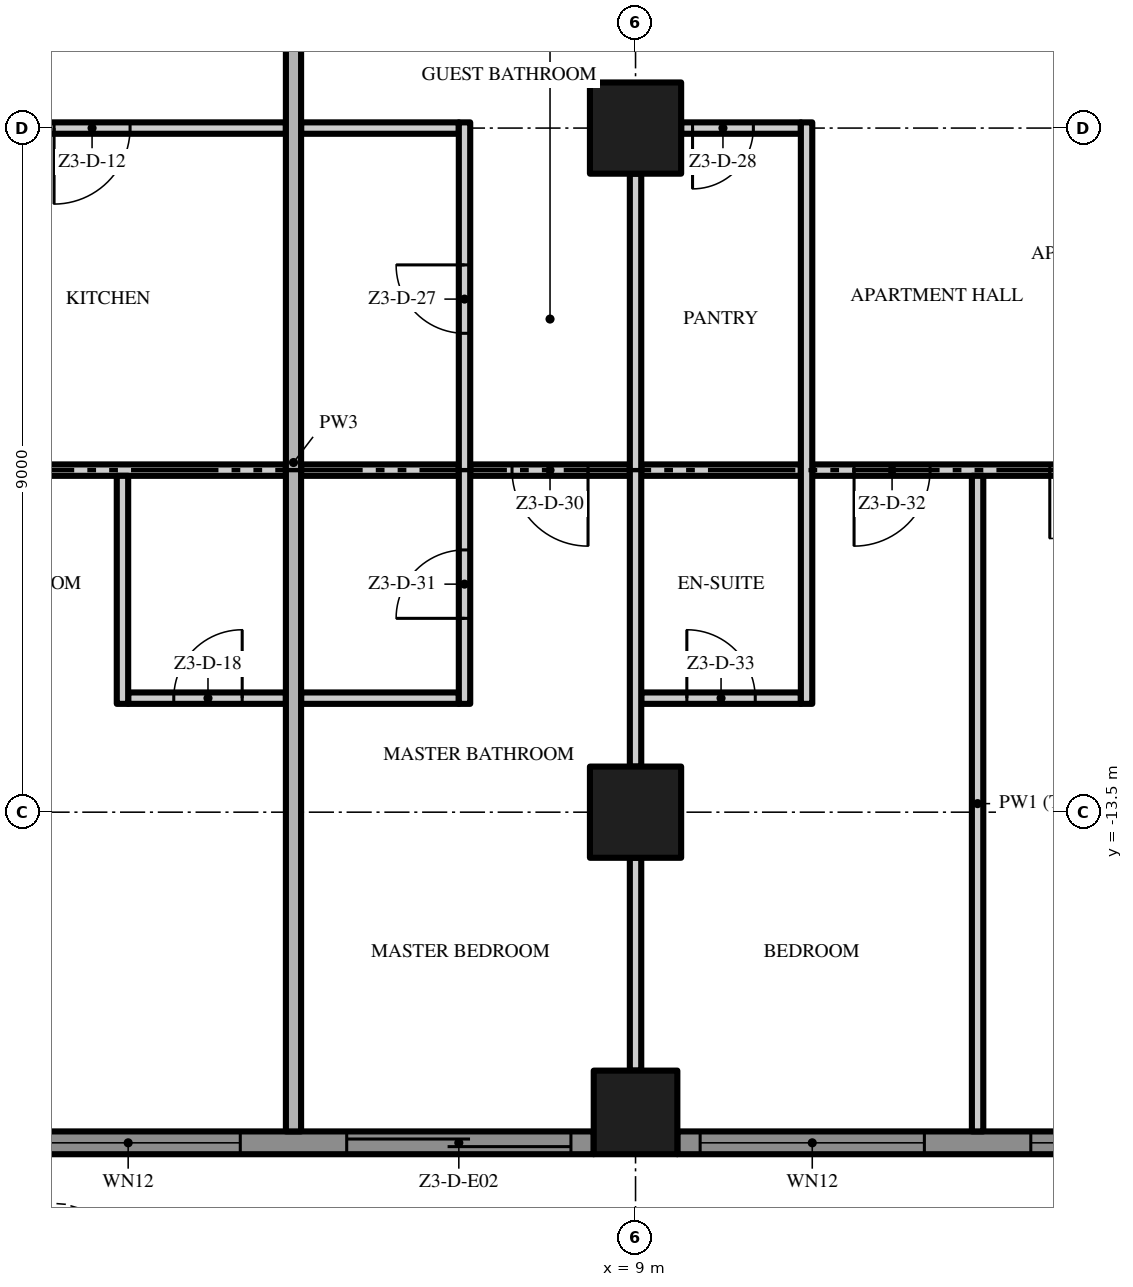
"""IFC4 building model, lengths in metres.
Left out: names, types, materials, properties, quantities, classifications, styles, units other than length and angle.
Written with IfcOpenShell. Run it as: python <this file> out.ifc"""

import sys

from ifc_helpers import new_model, si_unit, direction, frame, frame_2d, origin, origin_2d, place, context, subcontext, project, spatial, polyline, rectangle, outline, extrude, element, fill, save


model = new_model("IFC4")
c1 = context("Model", 3, precision=1e-05, world=origin(), true_north=direction((0.0, 1.0)))
c2 = subcontext(c1, "Body", "Model", "MODEL_VIEW")
j1 = project(units=[si_unit("LENGTHUNIT", "METRE"), si_unit("PLANEANGLEUNIT", "RADIAN")], contexts=[c1])
p1 = place(None, origin())
s1 = spatial("IfcSite", under=j1, at=p1, CompositionType="ELEMENT")
p2 = place(p1, origin())
s2 = spatial("IfcBuilding", under=s1, at=p2, CompositionType="ELEMENT")
p3 = place(p2, frame((0.0, 0.0, 159.2)))
s3 = spatial("IfcBuildingStorey", under=s2, at=p3, CompositionType="ELEMENT", Elevation=159.2)
p4 = place(p3, frame((9.0, -13.5, 0.0), z_axis=(0.0, 0.0, 1.0), x_axis=(1.0, 0.0, 0.0)))
e1 = element("IfcColumn", 1, at=p4, inside=s3, PredefinedType="COLUMN", context=c2, shape_type="SweptSolid", body=[
    extrude(rectangle(XDim=1.2, YDim=1.2, at=origin_2d()), origin(), (0.0, 0.0, 1.0), 3.5),
])
p5 = place(p3, frame((9.0, -17.45, 0.0), z_axis=(0.0, 0.0, 1.0), x_axis=(1.0, 0.0, 0.0)))
e2 = element("IfcColumn", 2, at=p5, inside=s3, PredefinedType="COLUMN", context=c2, shape_type="SweptSolid", body=[
    extrude(rectangle(XDim=1.1, YDim=1.1, at=origin_2d()), origin(), (0.0, 0.0, 1.0), 3.5),
])
p6 = place(p3, frame((9.0, -4.5, 0.0), z_axis=(0.0, 0.0, 1.0), x_axis=(1.0, 0.0, 0.0)))
e3 = element("IfcColumn", 3, at=p6, inside=s3, PredefinedType="COLUMN", context=c2, shape_type="SweptSolid", body=[
    extrude(rectangle(XDim=1.2, YDim=1.2, at=origin_2d()), origin(), (0.0, 0.0, 1.0), 3.5),
])
p7 = place(p3, frame((8.45, -17.85, 0.0), z_axis=(0.0, 0.0, 1.0), x_axis=(-1.0, 0.0, 0.0)))
e4 = element("IfcWall", 4, at=p7, inside=s3, PredefinedType="SOLIDWALL", context=c2, shape_type="SweptSolid", body=[
    extrude(rectangle(XDim=7.9, YDim=0.3, at=frame_2d((3.95, 0.0))), origin(), (0.0, 0.0, 1.0), 3.5),
])
p8 = place(p7, frame((4.65, 0.0, 0.45)))
e5 = element("IfcOpeningElement", 5, at=p8, cuts=e4, PredefinedType="OPENING", context=c2, shape_type="SweptSolid", body=[
    extrude(rectangle(XDim=2.95, YDim=2.65, at=frame_2d((1.475, 1.325))), frame((0.0, 0.16, 0.0), z_axis=(0.0, -1.0, 0.0), x_axis=(1.0, 0.0, 0.0)), (0.0, 0.0, 1.0), 0.32),
])
p9 = place(p7, frame((0.3, 0.0, 0.0)))
e6 = element("IfcOpeningElement", 6, at=p9, cuts=e4, PredefinedType="OPENING", context=c2, shape_type="SweptSolid", body=[
    extrude(rectangle(XDim=2.95, YDim=2.4, at=frame_2d((1.475, 1.2))), frame((0.0, 0.16, 0.0), z_axis=(0.0, -1.0, 0.0), x_axis=(1.0, 0.0, 0.0)), (0.0, 0.0, 1.0), 0.32),
])
p10 = place(p3, frame((16.9, -17.85, 0.0), z_axis=(0.0, 0.0, 1.0), x_axis=(-1.0, 0.0, 0.0)))
e7 = element("IfcWall", 7, at=p10, inside=s3, PredefinedType="SOLIDWALL", context=c2, shape_type="SweptSolid", body=[
    extrude(rectangle(XDim=7.35, YDim=0.3, at=frame_2d((3.675, 0.0))), origin(), (0.0, 0.0, 1.0), 3.5),
])
p11 = place(p10, frame((4.1, 0.0, 0.45)))
e8 = element("IfcOpeningElement", 8, at=p11, cuts=e7, PredefinedType="OPENING", context=c2, shape_type="SweptSolid", body=[
    extrude(rectangle(XDim=2.95, YDim=2.65, at=frame_2d((1.475, 1.325))), frame((0.0, 0.16, 0.0), z_axis=(0.0, -1.0, 0.0), x_axis=(1.0, 0.0, 0.0)), (0.0, 0.0, 1.0), 0.32),
])
p12 = place(p10, frame((0.3, 0.0, 0.45)))
e9 = element("IfcOpeningElement", 9, at=p12, cuts=e7, PredefinedType="OPENING", context=c2, shape_type="SweptSolid", body=[
    extrude(rectangle(XDim=2.4, YDim=2.65, at=frame_2d((1.2, 1.325))), frame((0.0, 0.16, 0.0), z_axis=(0.0, -1.0, 0.0), x_axis=(1.0, 0.0, 0.0)), (0.0, 0.0, 1.0), 0.32),
])
p13 = place(p3, origin())
e10 = element("IfcWall", 10, at=p13, inside=s3, PredefinedType="USERDEFINED", context=c2, shape_type="SweptSolid", body=[
    extrude(outline(polyline([(-18.0, -19.8), (-16.5, -19.095), (-15.0, -18.659), (-14.25, -18.6), (-13.5, -18.659), (-12.0, -19.095), (-10.5, -19.8), (-9.0, -20.505), (-7.5, -20.941), (-6.75, -21.0), (-6.0, -20.941), (-4.5, -20.505), (-3.0, -19.8), (-1.5, -19.095), (0.0, -18.659), (0.75, -18.6), (1.5, -18.659), (3.0, -19.095), (4.5, -19.8), (6.0, -20.505), (7.5, -20.941), (8.25, -21.0), (9.0, -20.941), (10.5, -20.505), (12.0, -19.8), (13.5, -19.095), (15.0, -18.659), (15.75, -18.6), (16.5, -18.659), (18.0, -19.095), (18.07, -18.855), (16.545, -18.411), (15.75, -18.349), (14.955, -18.411), (13.411, -18.86), (11.894, -19.574), (10.411, -20.271), (8.955, -20.694), (8.25, -20.749), (7.545, -20.694), (6.089, -20.271), (4.606, -19.574), (3.089, -18.86), (1.545, -18.411), (0.75, -18.349), (-0.045, -18.411), (-1.589, -18.86), (-3.106, -19.574), (-4.589, -20.271), (-6.045, -20.694), (-6.75, -20.749), (-7.455, -20.694), (-8.911, -20.271), (-10.394, -19.574), (-11.911, -18.86), (-13.455, -18.411), (-14.25, -18.349), (-15.045, -18.411), (-16.589, -18.86), (-18.106, -19.574), (-18.0, -19.8)])), origin(), (0.0, 0.0, 1.0), 0.9),
])
p14 = place(p3, frame((2.325, -12.0, 0.0), z_axis=(0.0, 0.0, 1.0), x_axis=(1.0, 0.0, 0.0)))
e11 = element("IfcWall", 11, at=p14, inside=s3, PredefinedType="PARTITIONING", context=c2, shape_type="SweptSolid", body=[
    extrude(rectangle(XDim=2.075, YDim=0.15, at=frame_2d((1.038, 0.0))), origin(), (0.0, 0.0, 1.0), 3.5),
])
p15 = place(p14, frame((0.6, 0.0, 0.0)))
e12 = element("IfcOpeningElement", 12, at=p15, cuts=e11, PredefinedType="OPENING", context=c2, shape_type="SweptSolid", body=[
    extrude(rectangle(XDim=0.9, YDim=2.1, at=frame_2d((0.45, 1.05))), frame((0.0, 0.085, 0.0), z_axis=(0.0, -1.0, 0.0), x_axis=(1.0, 0.0, 0.0)), (0.0, 0.0, 1.0), 0.17),
])
p16 = place(p3, frame((4.6, -12.0, 0.0), z_axis=(0.0, 0.0, 1.0), x_axis=(1.0, 0.0, 0.0)))
e13 = element("IfcWall", 13, at=p16, inside=s3, PredefinedType="PARTITIONING", context=c2, shape_type="SweptSolid", body=[
    extrude(rectangle(XDim=2.075, YDim=0.15, at=frame_2d((1.038, 0.0))), origin(), (0.0, 0.0, 1.0), 3.5),
])
p17 = place(p3, frame((9.075, -12.0, 0.0), z_axis=(0.0, 0.0, 1.0), x_axis=(1.0, 0.0, 0.0)))
e14 = element("IfcWall", 14, at=p17, inside=s3, PredefinedType="PARTITIONING", context=c2, shape_type="SweptSolid", body=[
    extrude(rectangle(XDim=2.1, YDim=0.15, at=frame_2d((1.05, 0.0))), origin(), (0.0, 0.0, 1.0), 3.5),
])
p18 = place(p17, frame((0.6, 0.0, 0.0)))
e15 = element("IfcOpeningElement", 15, at=p18, cuts=e14, PredefinedType="OPENING", context=c2, shape_type="SweptSolid", body=[
    extrude(rectangle(XDim=0.9, YDim=2.1, at=frame_2d((0.45, 1.05))), frame((0.0, 0.085, 0.0), z_axis=(0.0, -1.0, 0.0), x_axis=(1.0, 0.0, 0.0)), (0.0, 0.0, 1.0), 0.17),
])
p19 = place(p3, frame((4.4, -9.0, 0.0), z_axis=(0.0, 0.0, 1.0), x_axis=(-1.0, 0.0, 0.0)))
e16 = element("IfcWall", 16, at=p19, inside=s3, PredefinedType="PARTITIONING", context=c2, shape_type="SweptSolid", body=[
    extrude(rectangle(XDim=8.825, YDim=0.15, at=frame_2d((4.412, 0.0))), origin(), (0.0, 0.0, 1.0), 3.5),
])
p20 = place(p19, frame((6.125, 0.0, 0.0)))
e17 = element("IfcOpeningElement", 17, at=p20, cuts=e16, PredefinedType="OPENING", context=c2, shape_type="SweptSolid", body=[
    extrude(rectangle(XDim=1.8, YDim=2.4, at=frame_2d((0.9, 1.2))), frame((0.0, 0.085, 0.0), z_axis=(0.0, -1.0, 0.0), x_axis=(1.0, 0.0, 0.0)), (0.0, 0.0, 1.0), 0.17),
])
p21 = place(p3, frame((4.6, -9.0, 0.0), z_axis=(0.0, 0.0, 1.0), x_axis=(1.0, 0.0, 0.0)))
e18 = element("IfcWall", 18, at=p21, inside=s3, PredefinedType="PARTITIONING", context=c2, shape_type="SweptSolid", body=[
    extrude(rectangle(XDim=2.075, YDim=0.15, at=frame_2d((1.038, 0.0))), origin(), (0.0, 0.0, 1.0), 3.5),
])
p22 = place(p3, frame((8.925, -9.0, 0.0), z_axis=(0.0, 0.0, 1.0), x_axis=(-1.0, 0.0, 0.0)))
e19 = element("IfcWall", 19, at=p22, inside=s3, PredefinedType="PARTITIONING", context=c2, shape_type="SweptSolid", body=[
    extrude(rectangle(XDim=2.1, YDim=0.15, at=frame_2d((1.05, 0.0))), origin(), (0.0, 0.0, 1.0), 3.5),
])
p23 = place(p22, frame((0.55, 0.0, 0.0)))
e20 = element("IfcOpeningElement", 20, at=p23, cuts=e19, PredefinedType="OPENING", context=c2, shape_type="SweptSolid", body=[
    extrude(rectangle(XDim=1.0, YDim=2.4, at=frame_2d((0.5, 1.2))), frame((0.0, 0.085, 0.0), z_axis=(0.0, -1.0, 0.0), x_axis=(1.0, 0.0, 0.0)), (0.0, 0.0, 1.0), 0.17),
])
p24 = place(p3, frame((9.075, -9.0, 0.0), z_axis=(0.0, 0.0, 1.0), x_axis=(1.0, 0.0, 0.0)))
e21 = element("IfcWall", 21, at=p24, inside=s3, PredefinedType="PARTITIONING", context=c2, shape_type="SweptSolid", body=[
    extrude(rectangle(XDim=2.1, YDim=0.15, at=frame_2d((1.05, 0.0))), origin(), (0.0, 0.0, 1.0), 3.5),
])
p25 = place(p3, frame((22.2, -9.0, 0.0), z_axis=(0.0, 0.0, 1.0), x_axis=(-1.0, 0.0, 0.0)))
e22 = element("IfcWall", 22, at=p25, inside=s3, PredefinedType="PARTITIONING", context=c2, shape_type="SweptSolid", body=[
    extrude(rectangle(XDim=10.875, YDim=0.15, at=frame_2d((5.438, 0.0))), origin(), (0.0, 0.0, 1.0), 3.5),
])
p26 = place(p25, frame((9.325, 0.0, 0.0)))
e23 = element("IfcOpeningElement", 23, at=p26, cuts=e22, PredefinedType="OPENING", context=c2, shape_type="SweptSolid", body=[
    extrude(rectangle(XDim=1.0, YDim=2.4, at=frame_2d((0.5, 1.2))), frame((0.0, 0.085, 0.0), z_axis=(0.0, -1.0, 0.0), x_axis=(1.0, 0.0, 0.0)), (0.0, 0.0, 1.0), 0.17),
])
p27 = place(p25, frame((5.95, 0.0, 0.0)))
e24 = element("IfcOpeningElement", 24, at=p27, cuts=e22, PredefinedType="OPENING", context=c2, shape_type="SweptSolid", body=[
    extrude(rectangle(XDim=1.8, YDim=2.4, at=frame_2d((0.9, 1.2))), frame((0.0, 0.085, 0.0), z_axis=(0.0, -1.0, 0.0), x_axis=(1.0, 0.0, 0.0)), (0.0, 0.0, 1.0), 0.17),
])
p28 = place(p3, frame((4.4, -4.5, 0.0), z_axis=(0.0, 0.0, 1.0), x_axis=(-1.0, 0.0, 0.0)))
e25 = element("IfcWall", 25, at=p28, inside=s3, PredefinedType="PARTITIONING", context=c2, shape_type="SweptSolid", body=[
    extrude(rectangle(XDim=3.8, YDim=0.15, at=frame_2d((1.9, 0.0))), origin(), (0.0, 0.0, 1.0), 3.5),
])
p29 = place(p28, frame((2.05, 0.0, 0.0)))
e26 = element("IfcOpeningElement", 26, at=p29, cuts=e25, PredefinedType="OPENING", context=c2, shape_type="SweptSolid", body=[
    extrude(rectangle(XDim=1.0, YDim=2.4, at=frame_2d((0.5, 1.2))), frame((0.0, 0.085, 0.0), z_axis=(0.0, -1.0, 0.0), x_axis=(1.0, 0.0, 0.0)), (0.0, 0.0, 1.0), 0.17),
])
p30 = place(p3, frame((4.6, -4.5, 0.0), z_axis=(0.0, 0.0, 1.0), x_axis=(1.0, 0.0, 0.0)))
e27 = element("IfcWall", 27, at=p30, inside=s3, PredefinedType="PARTITIONING", context=c2, shape_type="SweptSolid", body=[
    extrude(rectangle(XDim=2.075, YDim=0.15, at=frame_2d((1.038, 0.0))), origin(), (0.0, 0.0, 1.0), 3.5),
])
p31 = place(p3, frame((11.175, -4.5, 0.0), z_axis=(0.0, 0.0, 1.0), x_axis=(-1.0, 0.0, 0.0)))
e28 = element("IfcWall", 28, at=p31, inside=s3, PredefinedType="PARTITIONING", context=c2, shape_type="SweptSolid", body=[
    extrude(rectangle(XDim=1.575, YDim=0.15, at=frame_2d((0.787, 0.0))), origin(), (0.0, 0.0, 1.0), 3.5),
])
p32 = place(p31, frame((0.625, 0.0, 0.0)))
e29 = element("IfcOpeningElement", 29, at=p32, cuts=e28, PredefinedType="OPENING", context=c2, shape_type="SweptSolid", body=[
    extrude(rectangle(XDim=0.8, YDim=2.0, at=frame_2d((0.4, 1.0))), frame((0.0, 0.085, 0.0), z_axis=(0.0, -1.0, 0.0), x_axis=(1.0, 0.0, 0.0)), (0.0, 0.0, 1.0), 0.17),
])
p33 = place(p3, frame((2.25, -12.075, 0.0), z_axis=(0.0, 0.0, 1.0), x_axis=(0.0, 1.0, 0.0)))
e30 = element("IfcWall", 30, at=p33, inside=s3, PredefinedType="PARTITIONING", context=c2, shape_type="SweptSolid", body=[
    extrude(rectangle(XDim=3.0, YDim=0.15, at=frame_2d((1.5, 0.0))), origin(), (0.0, 0.0, 1.0), 3.5),
])
p34 = place(p3, frame((4.5, -17.7, 0.0), z_axis=(0.0, 0.0, 1.0), x_axis=(0.0, 1.0, 0.0)))
e31 = element("IfcWall", 31, at=p34, inside=s3, PredefinedType="PARTITIONING", context=c2, shape_type="SweptSolid", body=[
    extrude(rectangle(XDim=17.6, YDim=0.2, at=frame_2d((8.8, 0.0))), origin(), (0.0, 0.0, 1.0), 3.5),
])
p35 = place(p3, frame((6.75, -12.075, 0.0), z_axis=(0.0, 0.0, 1.0), x_axis=(0.0, 1.0, 0.0)))
e32 = element("IfcWall", 32, at=p35, inside=s3, PredefinedType="PARTITIONING", context=c2, shape_type="SweptSolid", body=[
    extrude(rectangle(XDim=7.65, YDim=0.15, at=frame_2d((3.825, 0.0))), origin(), (0.0, 0.0, 1.0), 3.5),
])
p36 = place(p35, frame((4.875, 0.0, 0.0)))
e33 = element("IfcOpeningElement", 33, at=p36, cuts=e32, PredefinedType="OPENING", context=c2, shape_type="SweptSolid", body=[
    extrude(rectangle(XDim=0.9, YDim=2.1, at=frame_2d((0.45, 1.05))), frame((0.0, 0.085, 0.0), z_axis=(0.0, -1.0, 0.0), x_axis=(1.0, 0.0, 0.0)), (0.0, 0.0, 1.0), 0.17),
])
p37 = place(p35, frame((1.125, 0.0, 0.0)))
e34 = element("IfcOpeningElement", 34, at=p37, cuts=e32, PredefinedType="OPENING", context=c2, shape_type="SweptSolid", body=[
    extrude(rectangle(XDim=0.9, YDim=2.1, at=frame_2d((0.45, 1.05))), frame((0.0, 0.085, 0.0), z_axis=(0.0, -1.0, 0.0), x_axis=(1.0, 0.0, 0.0)), (0.0, 0.0, 1.0), 0.17),
])
p38 = place(p3, frame((9.0, -16.9, 0.0), z_axis=(0.0, 0.0, 1.0), x_axis=(0.0, 1.0, 0.0)))
e35 = element("IfcWall", 35, at=p38, inside=s3, PredefinedType="PARTITIONING", context=c2, shape_type="SweptSolid", body=[
    extrude(rectangle(XDim=2.8, YDim=0.15, at=frame_2d((1.4, 0.0))), origin(), (0.0, 0.0, 1.0), 3.5),
])
p39 = place(p3, frame((9.0, -12.9, 0.0), z_axis=(0.0, 0.0, 1.0), x_axis=(0.0, 1.0, 0.0)))
e36 = element("IfcWall", 36, at=p39, inside=s3, PredefinedType="PARTITIONING", context=c2, shape_type="SweptSolid", body=[
    extrude(rectangle(XDim=7.8, YDim=0.15, at=frame_2d((3.9, 0.0))), origin(), (0.0, 0.0, 1.0), 3.5),
])
p40 = place(p3, frame((11.25, -12.075, 0.0), z_axis=(0.0, 0.0, 1.0), x_axis=(0.0, 1.0, 0.0)))
e37 = element("IfcWall", 37, at=p40, inside=s3, PredefinedType="PARTITIONING", context=c2, shape_type="SweptSolid", body=[
    extrude(rectangle(XDim=7.65, YDim=0.15, at=frame_2d((3.825, 0.0))), origin(), (0.0, 0.0, 1.0), 3.5),
])
p41 = place(p3, frame((13.5, -17.7, 0.0), z_axis=(0.0, 0.0, 1.0), x_axis=(0.0, 1.0, 0.0)))
e38 = element("IfcWall", 38, at=p41, inside=s3, PredefinedType="PARTITIONING", context=c2, shape_type="SweptSolid", body=[
    extrude(rectangle(XDim=8.625, YDim=0.15, at=frame_2d((4.312, 0.0))), origin(), (0.0, 0.0, 1.0), 3.5),
])
p42 = place(p8, origin())
e39 = element("IfcWindow", 39, at=p42, inside=s3, PartitioningType="SINGLE_PANEL", PredefinedType="WINDOW", context=c2, shape_type="SweptSolid", body=[
    extrude(rectangle(XDim=2.95, YDim=2.65, at=frame_2d((1.475, 1.325))), frame((0.0, 0.03, 0.0), z_axis=(0.0, -1.0, 0.0), x_axis=(1.0, 0.0, 0.0)), (0.0, 0.0, 1.0), 0.06),
])
fill(e5, e39)
p43 = place(p9, origin())
e40 = element("IfcDoor", 40, at=p43, inside=s3, OperationType="SINGLE_SWING_LEFT", PredefinedType="DOOR", context=c2, shape_type="SweptSolid", body=[
    extrude(rectangle(XDim=2.95, YDim=2.4, at=frame_2d((1.475, 1.2))), frame((0.0, 0.025, 0.0), z_axis=(0.0, -1.0, 0.0), x_axis=(1.0, 0.0, 0.0)), (0.0, 0.0, 1.0), 0.05),
])
fill(e6, e40)
p44 = place(p11, origin())
e41 = element("IfcWindow", 41, at=p44, inside=s3, PartitioningType="SINGLE_PANEL", PredefinedType="WINDOW", context=c2, shape_type="SweptSolid", body=[
    extrude(rectangle(XDim=2.95, YDim=2.65, at=frame_2d((1.475, 1.325))), frame((0.0, 0.03, 0.0), z_axis=(0.0, -1.0, 0.0), x_axis=(1.0, 0.0, 0.0)), (0.0, 0.0, 1.0), 0.06),
])
fill(e8, e41)
p45 = place(p12, origin())
e42 = element("IfcWindow", 42, at=p45, inside=s3, PartitioningType="SINGLE_PANEL", PredefinedType="WINDOW", context=c2, shape_type="SweptSolid", body=[
    extrude(rectangle(XDim=2.4, YDim=2.65, at=frame_2d((1.2, 1.325))), frame((0.0, 0.03, 0.0), z_axis=(0.0, -1.0, 0.0), x_axis=(1.0, 0.0, 0.0)), (0.0, 0.0, 1.0), 0.06),
])
fill(e9, e42)
p46 = place(p29, origin())
e43 = element("IfcDoor", 43, at=p46, inside=s3, OperationType="SINGLE_SWING_RIGHT", PredefinedType="DOOR", context=c2, shape_type="SweptSolid", body=[
    extrude(rectangle(XDim=1.0, YDim=2.4, at=frame_2d((0.5, 1.2))), frame((0.0, 0.025, 0.0), z_axis=(0.0, -1.0, 0.0), x_axis=(1.0, 0.0, 0.0)), (0.0, 0.0, 1.0), 0.05),
])
fill(e26, e43)
p47 = place(p15, origin())
e44 = element("IfcDoor", 44, at=p47, inside=s3, OperationType="SINGLE_SWING_RIGHT", PredefinedType="DOOR", context=c2, shape_type="SweptSolid", body=[
    extrude(rectangle(XDim=0.9, YDim=2.1, at=frame_2d((0.45, 1.05))), frame((0.0, 0.025, 0.0), z_axis=(0.0, -1.0, 0.0), x_axis=(1.0, 0.0, 0.0)), (0.0, 0.0, 1.0), 0.05),
])
fill(e12, e44)
p48 = place(p36, origin())
e45 = element("IfcDoor", 45, at=p48, inside=s3, OperationType="SINGLE_SWING_RIGHT", PredefinedType="DOOR", context=c2, shape_type="SweptSolid", body=[
    extrude(rectangle(XDim=0.9, YDim=2.1, at=frame_2d((0.45, 1.05))), frame((0.0, 0.025, 0.0), z_axis=(0.0, -1.0, 0.0), x_axis=(1.0, 0.0, 0.0)), (0.0, 0.0, 1.0), 0.05),
])
fill(e33, e45)
p49 = place(p32, origin())
e46 = element("IfcDoor", 46, at=p49, inside=s3, OperationType="SINGLE_SWING_RIGHT", PredefinedType="DOOR", context=c2, shape_type="SweptSolid", body=[
    extrude(rectangle(XDim=0.8, YDim=2.0, at=frame_2d((0.4, 1.0))), frame((0.0, 0.025, 0.0), z_axis=(0.0, -1.0, 0.0), x_axis=(1.0, 0.0, 0.0)), (0.0, 0.0, 1.0), 0.05),
])
fill(e29, e46)
p50 = place(p23, origin())
e47 = element("IfcDoor", 47, at=p50, inside=s3, OperationType="SINGLE_SWING_LEFT", PredefinedType="DOOR", context=c2, shape_type="SweptSolid", body=[
    extrude(rectangle(XDim=1.0, YDim=2.4, at=frame_2d((0.5, 1.2))), frame((0.0, 0.025, 0.0), z_axis=(0.0, -1.0, 0.0), x_axis=(1.0, 0.0, 0.0)), (0.0, 0.0, 1.0), 0.05),
])
fill(e20, e47)
p51 = place(p37, origin())
e48 = element("IfcDoor", 48, at=p51, inside=s3, OperationType="SINGLE_SWING_LEFT", PredefinedType="DOOR", context=c2, shape_type="SweptSolid", body=[
    extrude(rectangle(XDim=0.9, YDim=2.1, at=frame_2d((0.45, 1.05))), frame((0.0, 0.025, 0.0), z_axis=(0.0, -1.0, 0.0), x_axis=(1.0, 0.0, 0.0)), (0.0, 0.0, 1.0), 0.05),
])
fill(e34, e48)
p52 = place(p26, origin())
e49 = element("IfcDoor", 49, at=p52, inside=s3, OperationType="SINGLE_SWING_RIGHT", PredefinedType="DOOR", context=c2, shape_type="SweptSolid", body=[
    extrude(rectangle(XDim=1.0, YDim=2.4, at=frame_2d((0.5, 1.2))), frame((0.0, 0.025, 0.0), z_axis=(0.0, -1.0, 0.0), x_axis=(1.0, 0.0, 0.0)), (0.0, 0.0, 1.0), 0.05),
])
fill(e23, e49)
p53 = place(p18, origin())
e50 = element("IfcDoor", 50, at=p53, inside=s3, OperationType="SINGLE_SWING_LEFT", PredefinedType="DOOR", context=c2, shape_type="SweptSolid", body=[
    extrude(rectangle(XDim=0.9, YDim=2.1, at=frame_2d((0.45, 1.05))), frame((0.0, 0.025, 0.0), z_axis=(0.0, -1.0, 0.0), x_axis=(1.0, 0.0, 0.0)), (0.0, 0.0, 1.0), 0.05),
])
fill(e15, e50)
p54 = place(p27, origin())
e51 = element("IfcDoor", 51, at=p54, inside=s3, OperationType="DOUBLE_DOOR_SINGLE_SWING", PredefinedType="DOOR", context=c2, shape_type="SweptSolid", body=[
    extrude(rectangle(XDim=1.8, YDim=2.4, at=frame_2d((0.9, 1.2))), frame((0.0, 0.025, 0.0), z_axis=(0.0, -1.0, 0.0), x_axis=(1.0, 0.0, 0.0)), (0.0, 0.0, 1.0), 0.05),
])
fill(e24, e51)
save(model, sys.argv[1])
